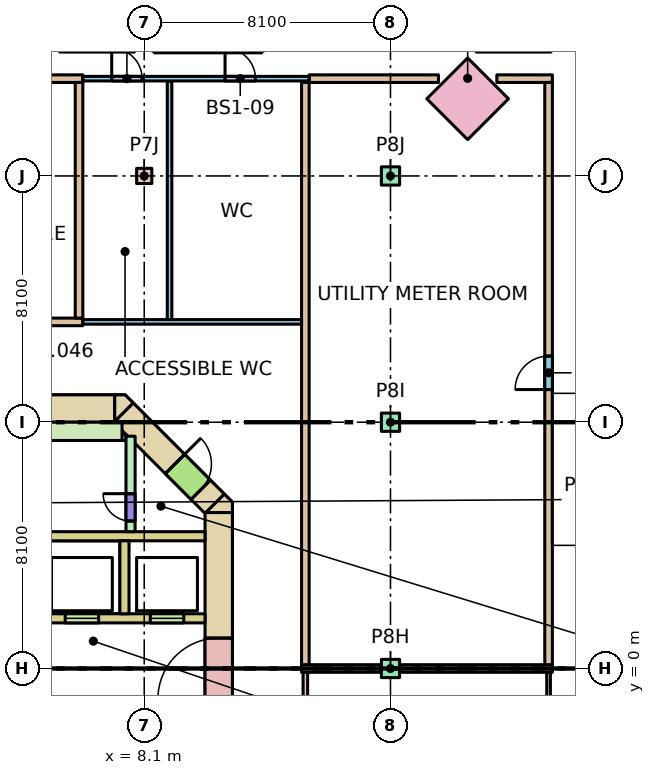
"""IFC4 building model, lengths in metres.
Left out: names, types, materials, properties, quantities, classifications, styles, units other than length and angle.
Written with IfcOpenShell. Run it as: python <this file> out.ifc"""

import sys

from ifc_helpers import new_model, si_unit, direction, frame, frame_2d, origin, origin_2d, place, context, subcontext, project, spatial, polyline, rectangle, outline, extrude, element, fill, save


model = new_model("IFC4")
c1 = context("Model", 3, precision=1e-05, world=origin(), true_north=direction((0.0, 1.0)))
c2 = subcontext(c1, "Body", "Model", "MODEL_VIEW")
j1 = project(units=[si_unit("LENGTHUNIT", "METRE"), si_unit("PLANEANGLEUNIT", "RADIAN")], contexts=[c1])
p1 = place(None, origin())
s1 = spatial("IfcSite", under=j1, at=p1, CompositionType="ELEMENT")
p2 = place(p1, origin())
s2 = spatial("IfcBuilding", under=s1, at=p2, CompositionType="ELEMENT")
p3 = place(p2, frame((0.0, 0.0, -3.6)))
s3 = spatial("IfcBuildingStorey", under=s2, at=p3, CompositionType="ELEMENT", Elevation=-3.6)
p4 = place(p3, frame((8.1, 16.2, 0.0), z_axis=(0.0, 0.0, 1.0), x_axis=(1.0, 0.0, 0.0)))
e1 = element("IfcColumn", 1, at=p4, inside=s3, PredefinedType="COLUMN", context=c2, shape_type="SweptSolid", body=[
    extrude(rectangle(XDim=0.5, YDim=0.5, at=origin_2d()), origin(), (0.0, 0.0, 1.0), 3.6),
])
for number, where, z_axis, x_axis in (
    (2, (16.2, 0.0, 0.0), (0.0, 0.0, 1.0), (1.0, 0.0, 0.0)),
    (3, (16.2, 8.1, 0.0), (0.0, 0.0, 1.0), (1.0, 0.0, 0.0)),
    (4, (16.2, 16.2, 0.0), (0.0, 0.0, 1.0), (1.0, 0.0, 0.0)),
):
    element("IfcColumn", number, at=place(p3, frame(where, z_axis=z_axis, x_axis=x_axis)), inside=s3, PredefinedType="COLUMN", context=c2, shape_type="SweptSolid", body=[
        extrude(rectangle(XDim=0.6, YDim=0.6, at=origin_2d()), origin(), (0.0, 0.0, 1.0), 3.6),
    ])
p5 = place(p3, frame((18.738, 18.738, 0.0), z_axis=(0.0, 0.0, 1.0), x_axis=(-0.707106781187, 0.707106781187, 0.0)))
e5 = element("IfcColumn", 5, at=p5, inside=s3, PredefinedType="COLUMN", context=c2, shape_type="SweptSolid", body=[
    extrude(rectangle(XDim=1.9, YDim=1.9, at=origin_2d()), origin(), (0.0, 0.0, 1.0), 3.6),
])
p6 = place(p3, frame((-7.13, 8.55, -0.32), z_axis=(0.0, 0.0, 1.0), x_axis=(1.0, 0.0, 0.0)))
e6 = element("IfcWall", 6, at=p6, inside=s3, PredefinedType="SHEAR", context=c2, shape_type="SweptSolid", body=[
    extrude(rectangle(XDim=14.26, YDim=0.9, at=frame_2d((7.13, 0.0))), origin(), (0.0, 0.0, 1.0), 3.6),
])
p7 = place(p6, frame((5.48, 0.0, 0.32)))
e7 = element("IfcOpeningElement", 7, at=p7, cuts=e6, PredefinedType="OPENING", context=c2, shape_type="SweptSolid", body=[
    extrude(rectangle(XDim=0.7, YDim=2.1, at=frame_2d((0.35, 1.05))), frame((0.0, 0.46, 0.0), z_axis=(0.0, -1.0, 0.0), x_axis=(1.0, 0.0, 0.0)), (0.0, 0.0, 1.0), 0.92),
])
p8 = place(p6, frame((7.155, 0.0, 0.32)))
e8 = element("IfcOpeningElement", 8, at=p8, cuts=e6, PredefinedType="OPENING", context=c2, shape_type="SweptSolid", body=[
    extrude(rectangle(XDim=0.9, YDim=2.1, at=frame_2d((0.45, 1.05))), frame((0.0, 0.46, 0.0), z_axis=(0.0, -1.0, 0.0), x_axis=(1.0, 0.0, 0.0)), (0.0, 0.0, 1.0), 0.92),
])
p9 = place(p3, frame((10.55, -5.13, -0.32), z_axis=(0.0, 0.0, 1.0), x_axis=(0.0, 1.0, 0.0)))
e9 = element("IfcWall", 9, at=p9, inside=s3, PredefinedType="SHEAR", context=c2, shape_type="SweptSolid", body=[
    extrude(rectangle(XDim=10.26, YDim=0.9, at=frame_2d((5.13, 0.0))), origin(), (0.0, 0.0, 1.0), 3.6),
])
p10 = place(p9, frame((4.13, 0.0, 0.32)))
e10 = element("IfcOpeningElement", 10, at=p10, cuts=e9, PredefinedType="OPENING", context=c2, shape_type="SweptSolid", body=[
    extrude(rectangle(XDim=2.0, YDim=2.1, at=frame_2d((1.0, 1.05))), frame((0.0, 0.46, 0.0), z_axis=(0.0, -1.0, 0.0), x_axis=(1.0, 0.0, 0.0)), (0.0, 0.0, 1.0), 0.92),
])
p11 = place(p3, frame((7.418, 8.418, -0.32), z_axis=(0.0, 0.0, 1.0), x_axis=(0.707106781187, -0.707106781187, 0.0)))
e11 = element("IfcWall", 11, at=p11, inside=s3, PredefinedType="SHEAR", context=c2, shape_type="SweptSolid", body=[
    extrude(rectangle(XDim=4.243, YDim=0.9, at=frame_2d((2.121, 0.0))), origin(), (0.0, 0.0, 1.0), 3.6),
])
p12 = place(p11, frame((2.393, 0.0, 0.32)))
e12 = element("IfcOpeningElement", 12, at=p12, cuts=e11, PredefinedType="OPENING", context=c2, shape_type="SweptSolid", body=[
    extrude(rectangle(XDim=1.2, YDim=2.1, at=frame_2d((0.6, 1.05))), frame((0.0, 0.46, 0.0), z_axis=(0.0, -1.0, 0.0), x_axis=(1.0, 0.0, 0.0)), (0.0, 0.0, 1.0), 0.92),
])
p13 = place(p3, frame((0.0, 0.0, -0.32)))
e13 = element("IfcWall", 13, at=p13, inside=s3, PredefinedType="SHEAR", context=c2, shape_type="SweptSolid", body=[
    extrude(outline(polyline([(11.0, 5.473), (11.0, 5.13), (10.13, 5.13), (10.736, 5.736), (11.0, 5.473)])), origin(), (0.0, 0.0, 1.0), 3.6),
])
p14 = place(p3, frame((0.0, 0.0, -0.32)))
e14 = element("IfcWall", 14, at=p14, inside=s3, PredefinedType="SHEAR", context=c2, shape_type="SweptSolid", body=[
    extrude(outline(polyline([(7.473, 9.0), (7.736, 8.736), (7.13, 8.13), (7.13, 9.0), (7.473, 9.0)])), origin(), (0.0, 0.0, 1.0), 3.6),
])
p15 = place(p3, frame((2.0, 4.35, 0.0), z_axis=(0.0, 0.0, 1.0), x_axis=(1.0, 0.0, 0.0)))
e15 = element("IfcWall", 15, at=p15, inside=s3, PredefinedType="SOLIDWALL", context=c2, shape_type="SweptSolid", body=[
    extrude(rectangle(XDim=8.1, YDim=0.3, at=frame_2d((4.05, 0.0))), origin(), (0.0, 0.0, 1.0), 3.28),
])
p16 = place(p3, frame((2.0, 1.65, 0.0), z_axis=(0.0, 0.0, 1.0), x_axis=(1.0, 0.0, 0.0)))
e16 = element("IfcWall", 16, at=p16, inside=s3, PredefinedType="SOLIDWALL", context=c2, shape_type="SweptSolid", body=[
    extrude(rectangle(XDim=8.1, YDim=0.3, at=frame_2d((4.05, 0.0))), origin(), (0.0, 0.0, 1.0), 3.28),
])
p17 = place(p16, frame((0.85, 0.0, 0.0)))
e17 = element("IfcOpeningElement", 17, at=p17, cuts=e16, PredefinedType="OPENING", context=c2, shape_type="SweptSolid", body=[
    extrude(rectangle(XDim=1.1, YDim=2.1, at=frame_2d((0.55, 1.05))), frame((0.0, 0.16, 0.0), z_axis=(0.0, -1.0, 0.0), x_axis=(1.0, 0.0, 0.0)), (0.0, 0.0, 1.0), 0.32),
])
p18 = place(p16, frame((3.5, 0.0, 0.0)))
e18 = element("IfcOpeningElement", 18, at=p18, cuts=e16, PredefinedType="OPENING", context=c2, shape_type="SweptSolid", body=[
    extrude(rectangle(XDim=1.1, YDim=2.1, at=frame_2d((0.55, 1.05))), frame((0.0, 0.16, 0.0), z_axis=(0.0, -1.0, 0.0), x_axis=(1.0, 0.0, 0.0)), (0.0, 0.0, 1.0), 0.32),
])
p19 = place(p16, frame((6.3, 0.0, 0.0)))
e19 = element("IfcOpeningElement", 19, at=p19, cuts=e16, PredefinedType="OPENING", context=c2, shape_type="SweptSolid", body=[
    extrude(rectangle(XDim=1.1, YDim=2.1, at=frame_2d((0.55, 1.05))), frame((0.0, 0.16, 0.0), z_axis=(0.0, -1.0, 0.0), x_axis=(1.0, 0.0, 0.0)), (0.0, 0.0, 1.0), 0.32),
])
p20 = place(p3, frame((7.45, 1.8, 0.0), z_axis=(0.0, 0.0, 1.0), x_axis=(0.0, 1.0, 0.0)))
e20 = element("IfcWall", 20, at=p20, inside=s3, PredefinedType="SOLIDWALL", context=c2, shape_type="SweptSolid", body=[
    extrude(rectangle(XDim=2.4, YDim=0.3, at=frame_2d((1.2, 0.0))), origin(), (0.0, 0.0, 1.0), 3.28),
])
p21 = place(p3, frame((7.65, 4.5, 0.0), z_axis=(0.0, 0.0, 1.0), x_axis=(0.0, 1.0, 0.0)))
e21 = element("IfcWall", 21, at=p21, inside=s3, PredefinedType="SHEAR", context=c2, shape_type="SweptSolid", body=[
    extrude(rectangle(XDim=3.14, YDim=0.3, at=frame_2d((1.57, 0.0))), origin(), (0.0, 0.0, 1.0), 3.28),
])
p22 = place(p21, frame((0.35, 0.0, 0.0)))
e22 = element("IfcOpeningElement", 22, at=p22, cuts=e21, PredefinedType="OPENING", context=c2, shape_type="SweptSolid", body=[
    extrude(rectangle(XDim=0.9, YDim=2.1, at=frame_2d((0.45, 1.05))), frame((0.0, 0.16, 0.0), z_axis=(0.0, -1.0, 0.0), x_axis=(1.0, 0.0, 0.0)), (0.0, 0.0, 1.0), 0.32),
])
p23 = place(p3, frame((2.0, 7.8, 0.0), z_axis=(0.0, 0.0, 1.0), x_axis=(1.0, 0.0, 0.0)))
e23 = element("IfcWall", 23, at=p23, inside=s3, PredefinedType="SHEAR", context=c2, shape_type="SweptSolid", body=[
    extrude(rectangle(XDim=5.37, YDim=0.6, at=frame_2d((2.685, 0.0))), origin(), (0.0, 0.0, 1.0), 3.28),
])
p24 = place(p3, frame((6.9, 7.6, 0.0), z_axis=(0.0, 0.0, 1.0), x_axis=(1.0, 0.0, 0.0)))
e24 = element("IfcWall", 24, at=p24, inside=s3, PredefinedType="SHEAR", context=c2, shape_type="SweptSolid", body=[
    extrude(rectangle(XDim=0.6, YDim=0.2, at=frame_2d((0.3, 0.0))), origin(), (0.0, 0.0, 1.0), 3.28),
])
p25 = place(p3, frame((13.275, 0.0, 0.0), z_axis=(0.0, 0.0, 1.0), x_axis=(1.0, 0.0, 0.0)))
e25 = element("IfcWall", 25, at=p25, inside=s3, PredefinedType="PARTITIONING", context=c2, shape_type="SweptSolid", body=[
    extrude(rectangle(XDim=2.615, YDim=0.25, at=frame_2d((1.308, 0.0))), origin(), (0.0, 0.0, 1.0), 3.15),
])
p26 = place(p3, frame((16.51, 0.0, 0.0), z_axis=(0.0, 0.0, 1.0), x_axis=(1.0, 0.0, 0.0)))
e26 = element("IfcWall", 26, at=p26, inside=s3, PredefinedType="PARTITIONING", context=c2, shape_type="SweptSolid", body=[
    extrude(rectangle(XDim=5.015, YDim=0.25, at=frame_2d((2.507, 0.0))), origin(), (0.0, 0.0, 1.0), 3.15),
])
p27 = place(p3, frame((21.4, -19.34, 0.0), z_axis=(0.0, 0.0, 1.0), x_axis=(0.0, 1.0, 0.0)))
e27 = element("IfcWall", 27, at=p27, inside=s3, PredefinedType="PARTITIONING", context=c2, shape_type="SweptSolid", body=[
    extrude(rectangle(XDim=19.215, YDim=0.12, at=frame_2d((9.607, 0.0))), origin(), (0.0, 0.0, 1.0), 3.15),
])
p28 = place(p3, frame((13.4, -11.275, 0.0), z_axis=(0.0, 0.0, 1.0), x_axis=(0.0, 1.0, 0.0)))
e28 = element("IfcWall", 28, at=p28, inside=s3, PredefinedType="PARTITIONING", context=c2, shape_type="SweptSolid", body=[
    extrude(rectangle(XDim=11.15, YDim=0.15, at=frame_2d((5.575, 0.0))), origin(), (0.0, 0.0, 1.0), 3.15),
])
p29 = place(p3, frame((13.525, 19.4, 0.0), z_axis=(0.0, 0.0, 1.0), x_axis=(1.0, 0.0, 0.0)))
e29 = element("IfcWall", 29, at=p29, inside=s3, PredefinedType="PARTITIONING", context=c2, shape_type="SweptSolid", body=[
    extrude(rectangle(XDim=4.253, YDim=0.25, at=frame_2d((2.127, 0.0))), origin(), (0.0, 0.0, 1.0), 3.15),
])
p30 = place(p3, frame((19.698, 19.4, 0.0), z_axis=(0.0, 0.0, 1.0), x_axis=(1.0, 0.0, 0.0)))
e30 = element("IfcWall", 30, at=p30, inside=s3, PredefinedType="PARTITIONING", context=c2, shape_type="SweptSolid", body=[
    extrude(rectangle(XDim=1.827, YDim=0.25, at=frame_2d((0.913, 0.0))), origin(), (0.0, 0.0, 1.0), 3.15),
])
p31 = place(p3, frame((21.4, 0.125, 0.0), z_axis=(0.0, 0.0, 1.0), x_axis=(0.0, 1.0, 0.0)))
e31 = element("IfcWall", 31, at=p31, inside=s3, PredefinedType="PARTITIONING", context=c2, shape_type="SweptSolid", body=[
    extrude(rectangle(XDim=19.15, YDim=0.25, at=frame_2d((9.575, 0.0))), origin(), (0.0, 0.0, 1.0), 3.15),
])
p32 = place(p31, frame((9.05, 0.0, 0.0)))
e32 = element("IfcOpeningElement", 32, at=p32, cuts=e31, PredefinedType="OPENING", context=c2, shape_type="SweptSolid", body=[
    extrude(rectangle(XDim=1.1, YDim=2.1, at=frame_2d((0.55, 1.05))), frame((0.0, 0.135, 0.0), z_axis=(0.0, -1.0, 0.0), x_axis=(1.0, 0.0, 0.0)), (0.0, 0.0, 1.0), 0.27),
])
p33 = place(p3, frame((13.4, 0.125, 0.0), z_axis=(0.0, 0.0, 1.0), x_axis=(0.0, 1.0, 0.0)))
e33 = element("IfcWall", 33, at=p33, inside=s3, PredefinedType="PARTITIONING", context=c2, shape_type="SweptSolid", body=[
    extrude(rectangle(XDim=19.15, YDim=0.25, at=frame_2d((9.575, 0.0))), origin(), (0.0, 0.0, 1.0), 3.15),
])
p34 = place(p3, frame((-7.319, 19.4, 0.0), z_axis=(0.0, 0.0, 1.0), x_axis=(1.0, 0.0, 0.0)))
e34 = element("IfcWall", 34, at=p34, inside=s3, PredefinedType="PARTITIONING", context=c2, shape_type="SweptSolid", body=[
    extrude(rectangle(XDim=13.4, YDim=0.25, at=frame_2d((6.7, 0.0))), origin(), (0.0, 0.0, 1.0), 3.15),
])
p35 = place(p34, frame((2.45, 0.0, 0.0)))
e35 = element("IfcOpeningElement", 35, at=p35, cuts=e34, PredefinedType="OPENING", context=c2, shape_type="SweptSolid", body=[
    extrude(rectangle(XDim=1.0, YDim=2.1, at=frame_2d((0.5, 1.05))), frame((0.0, 0.135, 0.0), z_axis=(0.0, -1.0, 0.0), x_axis=(1.0, 0.0, 0.0)), (0.0, 0.0, 1.0), 0.27),
])
p36 = place(p34, frame((9.206, 0.0, 0.0)))
e36 = element("IfcOpeningElement", 36, at=p36, cuts=e34, PredefinedType="OPENING", context=c2, shape_type="SweptSolid", body=[
    extrude(rectangle(XDim=1.0, YDim=2.1, at=frame_2d((0.5, 1.05))), frame((0.0, 0.135, 0.0), z_axis=(0.0, -1.0, 0.0), x_axis=(1.0, 0.0, 0.0)), (0.0, 0.0, 1.0), 0.27),
])
p37 = place(p3, frame((-7.319, 11.4, 0.0), z_axis=(0.0, 0.0, 1.0), x_axis=(1.0, 0.0, 0.0)))
e37 = element("IfcWall", 37, at=p37, inside=s3, PredefinedType="PARTITIONING", context=c2, shape_type="SweptSolid", body=[
    extrude(rectangle(XDim=13.4, YDim=0.25, at=frame_2d((6.7, 0.0))), origin(), (0.0, 0.0, 1.0), 3.15),
])
p38 = place(p3, frame((5.956, 11.525, 0.0), z_axis=(0.0, 0.0, 1.0), x_axis=(0.0, 1.0, 0.0)))
e38 = element("IfcWall", 38, at=p38, inside=s3, PredefinedType="PARTITIONING", context=c2, shape_type="SweptSolid", body=[
    extrude(rectangle(XDim=7.75, YDim=0.25, at=frame_2d((3.875, 0.0))), origin(), (0.0, 0.0, 1.0), 3.15),
])
p39 = place(p3, frame((8.933, 11.475, 0.0), z_axis=(0.0, 0.0, 1.0), x_axis=(0.0, 1.0, 0.0)))
e39 = element("IfcWall", 39, at=p39, inside=s3, PredefinedType="PARTITIONING", context=c2, shape_type="SweptSolid", body=[
    extrude(rectangle(XDim=7.85, YDim=0.15, at=frame_2d((3.925, 0.0))), origin(), (0.0, 0.0, 1.0), 3.15),
])
p40 = place(p3, frame((6.081, 19.4, 0.0), z_axis=(0.0, 0.0, 1.0), x_axis=(1.0, 0.0, 0.0)))
e40 = element("IfcWall", 40, at=p40, inside=s3, PredefinedType="PARTITIONING", context=c2, shape_type="SweptSolid", body=[
    extrude(rectangle(XDim=7.444, YDim=0.15, at=frame_2d((3.722, 0.0))), origin(), (0.0, 0.0, 1.0), 3.15),
])
p41 = place(p40, frame((0.95, 0.0, 0.0)))
e41 = element("IfcOpeningElement", 41, at=p41, cuts=e40, PredefinedType="OPENING", context=c2, shape_type="SweptSolid", body=[
    extrude(rectangle(XDim=1.0, YDim=2.1, at=frame_2d((0.5, 1.05))), frame((0.0, 0.085, 0.0), z_axis=(0.0, -1.0, 0.0), x_axis=(1.0, 0.0, 0.0)), (0.0, 0.0, 1.0), 0.17),
])
p42 = place(p40, frame((4.678, 0.0, 0.0)))
e42 = element("IfcOpeningElement", 42, at=p42, cuts=e40, PredefinedType="OPENING", context=c2, shape_type="SweptSolid", body=[
    extrude(rectangle(XDim=1.0, YDim=2.1, at=frame_2d((0.5, 1.05))), frame((0.0, 0.085, 0.0), z_axis=(0.0, -1.0, 0.0), x_axis=(1.0, 0.0, 0.0)), (0.0, 0.0, 1.0), 0.17),
])
p43 = place(p3, frame((6.081, 11.4, 0.0), z_axis=(0.0, 0.0, 1.0), x_axis=(1.0, 0.0, 0.0)))
e43 = element("IfcWall", 43, at=p43, inside=s3, PredefinedType="PARTITIONING", context=c2, shape_type="SweptSolid", body=[
    extrude(rectangle(XDim=7.194, YDim=0.15, at=frame_2d((3.597, 0.0))), origin(), (0.0, 0.0, 1.0), 3.15),
])
p44 = place(p18, origin())
e44 = element("IfcDoor", 44, at=p44, inside=s3, OperationType="DOUBLE_DOOR_SLIDING", PredefinedType="DOOR", context=c2, shape_type="SweptSolid", body=[
    extrude(rectangle(XDim=1.1, YDim=2.1, at=frame_2d((0.55, 1.05))), frame((0.0, 0.025, 0.0), z_axis=(0.0, -1.0, 0.0), x_axis=(1.0, 0.0, 0.0)), (0.0, 0.0, 1.0), 0.05),
])
fill(e18, e44)
p45 = place(p19, origin())
e45 = element("IfcDoor", 45, at=p45, inside=s3, OperationType="DOUBLE_DOOR_SLIDING", PredefinedType="DOOR", context=c2, shape_type="SweptSolid", body=[
    extrude(rectangle(XDim=1.1, YDim=2.1, at=frame_2d((0.55, 1.05))), frame((0.0, 0.025, 0.0), z_axis=(0.0, -1.0, 0.0), x_axis=(1.0, 0.0, 0.0)), (0.0, 0.0, 1.0), 0.05),
])
fill(e19, e45)
p46 = place(p22, origin())
e46 = element("IfcDoor", 46, at=p46, inside=s3, OperationType="SINGLE_SWING_RIGHT", PredefinedType="DOOR", context=c2, shape_type="SweptSolid", body=[
    extrude(rectangle(XDim=0.9, YDim=2.1, at=frame_2d((0.45, 1.05))), frame((0.0, 0.025, 0.0), z_axis=(0.0, -1.0, 0.0), x_axis=(1.0, 0.0, 0.0)), (0.0, 0.0, 1.0), 0.05),
])
fill(e22, e46)
p47 = place(p12, origin())
e47 = element("IfcDoor", 47, at=p47, inside=s3, OperationType="SINGLE_SWING_LEFT", PredefinedType="DOOR", context=c2, shape_type="SweptSolid", body=[
    extrude(rectangle(XDim=1.2, YDim=2.1, at=frame_2d((0.6, 1.05))), frame((0.0, 0.025, 0.0), z_axis=(0.0, -1.0, 0.0), x_axis=(1.0, 0.0, 0.0)), (0.0, 0.0, 1.0), 0.05),
])
fill(e12, e47)
p48 = place(p10, origin())
e48 = element("IfcDoor", 48, at=p48, inside=s3, OperationType="DOUBLE_DOOR_SINGLE_SWING", PredefinedType="DOOR", context=c2, shape_type="SweptSolid", body=[
    extrude(rectangle(XDim=2.0, YDim=2.1, at=frame_2d((1.0, 1.05))), frame((0.0, 0.025, 0.0), z_axis=(0.0, -1.0, 0.0), x_axis=(1.0, 0.0, 0.0)), (0.0, 0.0, 1.0), 0.05),
])
fill(e10, e48)
p49 = place(p41, origin())
e49 = element("IfcDoor", 49, at=p49, inside=s3, OperationType="SINGLE_SWING_LEFT", PredefinedType="DOOR", context=c2, shape_type="SweptSolid", body=[
    extrude(rectangle(XDim=1.0, YDim=2.1, at=frame_2d((0.5, 1.05))), frame((0.0, 0.025, 0.0), z_axis=(0.0, -1.0, 0.0), x_axis=(1.0, 0.0, 0.0)), (0.0, 0.0, 1.0), 0.05),
])
fill(e41, e49)
p50 = place(p42, origin())
e50 = element("IfcDoor", 50, at=p50, inside=s3, OperationType="SINGLE_SWING_LEFT", PredefinedType="DOOR", context=c2, shape_type="SweptSolid", body=[
    extrude(rectangle(XDim=1.0, YDim=2.1, at=frame_2d((0.5, 1.05))), frame((0.0, 0.025, 0.0), z_axis=(0.0, -1.0, 0.0), x_axis=(1.0, 0.0, 0.0)), (0.0, 0.0, 1.0), 0.05),
])
fill(e42, e50)
p51 = place(p32, origin())
e51 = element("IfcDoor", 51, at=p51, inside=s3, OperationType="SINGLE_SWING_LEFT", PredefinedType="DOOR", context=c2, shape_type="SweptSolid", body=[
    extrude(rectangle(XDim=1.1, YDim=2.1, at=frame_2d((0.55, 1.05))), frame((0.0, 0.025, 0.0), z_axis=(0.0, -1.0, 0.0), x_axis=(1.0, 0.0, 0.0)), (0.0, 0.0, 1.0), 0.05),
])
fill(e32, e51)
save(model, sys.argv[1])
